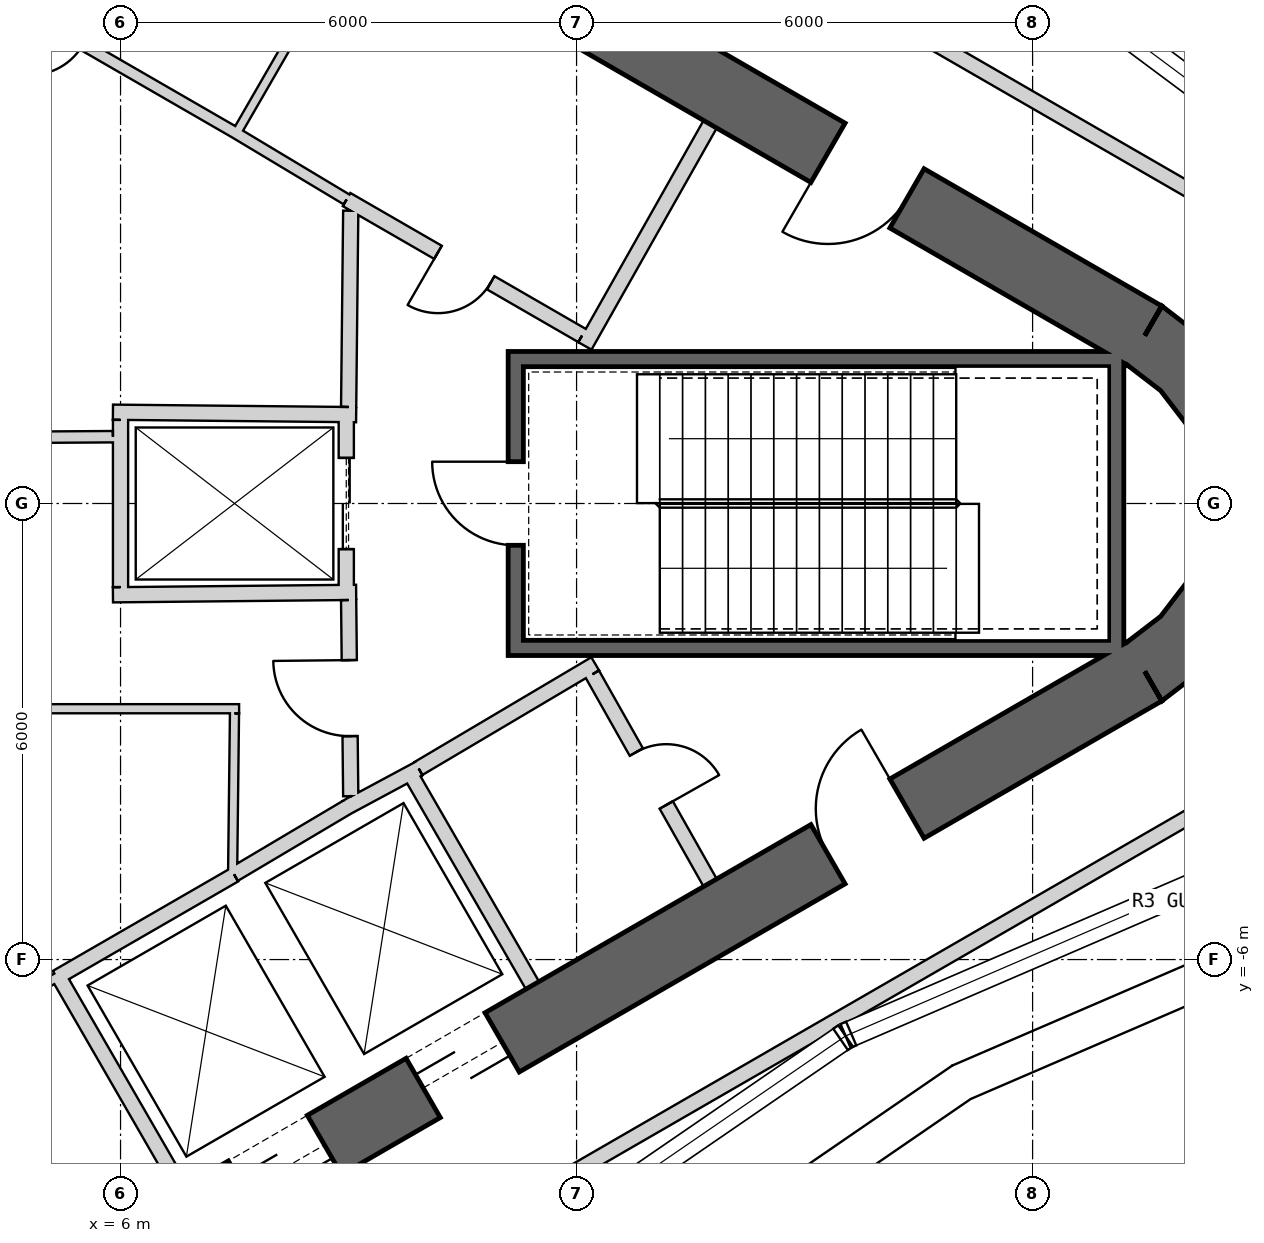
"""IFC4 building model, lengths in metres.
Left out: names, types, materials, properties, quantities, classifications, styles, units other than length and angle.
Written with IfcOpenShell. Run it as: python <this file> out.ifc"""

import sys

from ifc_helpers import new_model, si_unit, direction, frame, frame_2d, origin, place, context, subcontext, project, spatial, polyline, rectangle, outline, extrude, element, fill, save


model = new_model("IFC4")
c1 = context("Model", 3, precision=1e-05, world=origin(), true_north=direction((0.0, 1.0)))
c2 = subcontext(c1, "Body", "Model", "MODEL_VIEW")
j1 = project(units=[si_unit("LENGTHUNIT", "METRE"), si_unit("PLANEANGLEUNIT", "RADIAN")], contexts=[c1])
p1 = place(None, origin())
s1 = spatial("IfcSite", under=j1, at=p1, CompositionType="ELEMENT")
p2 = place(p1, origin())
s2 = spatial("IfcBuilding", under=s1, at=p2, CompositionType="ELEMENT")
p3 = place(p2, frame((0.0, 0.0, 435.3)))
s3 = spatial("IfcBuildingStorey", under=s2, at=p3, CompositionType="ELEMENT", Elevation=435.3)
p4 = place(p3, frame((19.475, 2.208, 0.0), z_axis=(0.0, 0.0, 1.0), x_axis=(-0.866028369851, 0.499994862586, 0.0)))
e1 = element("IfcWall", 1, at=p4, inside=s3, PredefinedType="SHEAR", context=c2, shape_type="SweptSolid", body=[
    extrude(rectangle(XDim=31.523, YDim=0.9, at=frame_2d((15.762, 0.0))), origin(), (0.0, 0.0, 1.0), 5.0),
])
p5 = place(p4, frame((3.612, 0.0, 0.0)))
e2 = element("IfcOpeningElement", 2, at=p5, cuts=e1, PredefinedType="OPENING", context=c2, shape_type="SweptSolid", body=[
    extrude(rectangle(XDim=1.2, YDim=2.4, at=frame_2d((0.6, 1.2))), frame((0.0, 0.46, 0.0), z_axis=(0.0, -1.0, 0.0), x_axis=(1.0, 0.0, 0.0)), (0.0, 0.0, 1.0), 0.92),
])
p6 = place(p4, frame((26.712, 0.0, 0.0)))
e3 = element("IfcOpeningElement", 3, at=p6, cuts=e1, PredefinedType="OPENING", context=c2, shape_type="SweptSolid", body=[
    extrude(rectangle(XDim=1.2, YDim=2.4, at=frame_2d((0.6, 1.2))), frame((0.0, 0.46, 0.0), z_axis=(0.0, -1.0, 0.0), x_axis=(1.0, 0.0, 0.0)), (0.0, 0.0, 1.0), 0.92),
])
p7 = place(p3, frame((-7.825, -17.97, 0.0), z_axis=(0.0, 0.0, 1.0), x_axis=(0.866028369851, 0.499994862586, 0.0)))
e4 = element("IfcWall", 4, at=p7, inside=s3, PredefinedType="SHEAR", context=c2, shape_type="SweptSolid", body=[
    extrude(rectangle(XDim=31.523, YDim=0.9, at=frame_2d((15.762, 0.0))), origin(), (0.0, 0.0, 1.0), 5.0),
])
p8 = place(p7, frame((17.862, 0.0, 0.0)))
e5 = element("IfcOpeningElement", 5, at=p8, cuts=e4, PredefinedType="OPENING", context=c2, shape_type="SweptSolid", body=[
    extrude(rectangle(XDim=1.2, YDim=2.4, at=frame_2d((0.6, 1.2))), frame((0.0, 0.46, 0.0), z_axis=(0.0, -1.0, 0.0), x_axis=(1.0, 0.0, 0.0)), (0.0, 0.0, 1.0), 0.92),
])
p9 = place(p7, frame((20.562, 0.0, 0.0)))
e6 = element("IfcOpeningElement", 6, at=p9, cuts=e4, PredefinedType="OPENING", context=c2, shape_type="SweptSolid", body=[
    extrude(rectangle(XDim=1.2, YDim=2.4, at=frame_2d((0.6, 1.2))), frame((0.0, 0.46, 0.0), z_axis=(0.0, -1.0, 0.0), x_axis=(1.0, 0.0, 0.0)), (0.0, 0.0, 1.0), 0.92),
])
p10 = place(p7, frame((26.712, 0.0, 0.0)))
e7 = element("IfcOpeningElement", 7, at=p10, cuts=e4, PredefinedType="OPENING", context=c2, shape_type="SweptSolid", body=[
    extrude(rectangle(XDim=1.2, YDim=2.4, at=frame_2d((0.6, 1.2))), frame((0.0, 0.46, 0.0), z_axis=(0.0, -1.0, 0.0), x_axis=(1.0, 0.0, 0.0)), (0.0, 0.0, 1.0), 0.92),
])
p11 = place(p7, frame((3.612, 0.0, 0.0)))
e8 = element("IfcOpeningElement", 8, at=p11, cuts=e4, PredefinedType="OPENING", context=c2, shape_type="SweptSolid", body=[
    extrude(rectangle(XDim=1.2, YDim=2.4, at=frame_2d((0.6, 1.2))), frame((0.0, 0.46, 0.0), z_axis=(0.0, -1.0, 0.0), x_axis=(1.0, 0.0, 0.0)), (0.0, 0.0, 1.0), 0.92),
])
p12 = place(p3, origin())
e9 = element("IfcWall", 9, at=p12, inside=s3, PredefinedType="SHEAR", context=c2, shape_type="SweptSolid", body=[
    extrude(outline(polyline([(19.7, -2.598), (20.321, -2.121), (20.798, -1.5), (21.098, -0.777), (21.2, 0.0), (21.098, 0.777), (20.798, 1.5), (20.321, 2.121), (19.7, 2.598), (19.25, 1.819), (19.685, 1.485), (20.019, 1.05), (20.229, 0.543), (20.3, 0.0), (20.229, -0.543), (20.019, -1.05), (19.685, -1.485), (19.25, -1.819), (19.7, -2.598)])), origin(), (0.0, 0.0, 1.0), 5.0),
])
p13 = place(p3, frame((6.795, -9.01, 0.0), z_axis=(0.0, 0.0, 1.0), x_axis=(-0.499984717929, 0.866034226713, 0.0)))
e10 = element("IfcWall", 10, at=p13, inside=s3, PredefinedType="PLUMBINGWALL", context=c2, shape_type="SweptSolid", body=[
    extrude(rectangle(XDim=3.25, YDim=0.2, at=frame_2d((1.625, 0.0))), origin(), (0.0, 0.0, 1.0), 4.75),
])
p14 = place(p3, frame((5.159, -6.236, 0.0), z_axis=(0.0, 0.0, 1.0), x_axis=(0.866036505625, 0.499980770555, 0.0)))
e11 = element("IfcWall", 11, at=p14, inside=s3, PredefinedType="PLUMBINGWALL", context=c2, shape_type="SweptSolid", body=[
    extrude(rectangle(XDim=2.7, YDim=0.2, at=frame_2d((1.35, 0.0))), origin(), (0.0, 0.0, 1.0), 4.75),
])
p15 = place(p3, frame((9.795, -3.525, 0.0), z_axis=(0.0, 0.0, 1.0), x_axis=(0.499984717929, -0.866034226713, 0.0)))
e12 = element("IfcWall", 12, at=p15, inside=s3, PredefinedType="PLUMBINGWALL", context=c2, shape_type="SweptSolid", body=[
    extrude(rectangle(XDim=3.25, YDim=0.2, at=frame_2d((1.625, 0.0))), origin(), (0.0, 0.0, 1.0), 4.75),
])
p16 = place(p3, frame((8.974, -3.999, 0.0), z_axis=(0.0, 0.0, 1.0), x_axis=(0.880907015104, 0.473289373154, 0.0)))
e13 = element("IfcWall", 13, at=p16, inside=s3, PredefinedType="PLUMBINGWALL", context=c2, shape_type="SweptSolid", body=[
    extrude(rectangle(XDim=1.078, YDim=0.2, at=frame_2d((0.539, 0.0))), origin(), (0.0, 0.0, 1.0), 4.75),
])
p17 = place(p3, frame((7.493, -4.878, 0.0), z_axis=(0.0, 0.0, 1.0), x_axis=(0.859981807212, 0.510324691999, 0.0)))
e14 = element("IfcWall", 14, at=p17, inside=s3, PredefinedType="PLUMBINGWALL", context=c2, shape_type="SweptSolid", body=[
    extrude(rectangle(XDim=1.845, YDim=0.2, at=frame_2d((0.922, 0.0))), origin(), (0.0, 0.0, 1.0), 4.75),
])
p18 = place(p3, frame((19.2, 1.9, -0.25), z_axis=(0.0, 0.0, 1.0), x_axis=(-1.0, 0.0, 0.0)))
e15 = element("IfcWall", 15, at=p18, inside=s3, PredefinedType="SHEAR", context=c2, shape_type="SweptSolid", body=[
    extrude(rectangle(XDim=8.1, YDim=0.2, at=frame_2d((4.05, 0.0))), origin(), (0.0, 0.0, 1.0), 5.0),
])
p19 = place(p3, frame((19.1, -2.0, -0.25), z_axis=(0.0, 0.0, 1.0), x_axis=(0.0, 1.0, 0.0)))
e16 = element("IfcWall", 16, at=p19, inside=s3, PredefinedType="SHEAR", context=c2, shape_type="SweptSolid", body=[
    extrude(rectangle(XDim=3.8, YDim=0.2, at=frame_2d((1.9, 0.0))), origin(), (0.0, 0.0, 1.0), 5.0),
])
p20 = place(p3, frame((11.1, -1.9, -0.25), z_axis=(0.0, 0.0, 1.0), x_axis=(1.0, 0.0, 0.0)))
e17 = element("IfcWall", 17, at=p20, inside=s3, PredefinedType="SHEAR", context=c2, shape_type="SweptSolid", body=[
    extrude(rectangle(XDim=7.9, YDim=0.2, at=frame_2d((3.95, 0.0))), origin(), (0.0, 0.0, 1.0), 5.0),
])
p21 = place(p3, frame((11.2, -1.8, -0.25), z_axis=(0.0, 0.0, 1.0), x_axis=(0.0, 1.0, 0.0)))
e18 = element("IfcWall", 18, at=p21, inside=s3, PredefinedType="SHEAR", context=c2, shape_type="SweptSolid", body=[
    extrude(rectangle(XDim=3.6, YDim=0.2, at=frame_2d((1.8, 0.0))), origin(), (0.0, 0.0, 1.0), 5.0),
])
p22 = place(p21, frame((1.25, 0.0, 0.25)))
e19 = element("IfcOpeningElement", 19, at=p22, cuts=e18, PredefinedType="OPENING", context=c2, shape_type="SweptSolid", body=[
    extrude(rectangle(XDim=1.1, YDim=2.1, at=frame_2d((0.55, 1.05))), frame((0.0, 0.11, 0.0), z_axis=(0.0, -1.0, 0.0), x_axis=(1.0, 0.0, 0.0)), (0.0, 0.0, 1.0), 0.22),
])
p23 = place(p3, frame((8.97, 1.2, 0.0), z_axis=(0.0, 0.0, 1.0), x_axis=(0.0, -1.0, 0.0)))
e20 = element("IfcWall", 20, at=p23, inside=s3, PredefinedType="PLUMBINGWALL", context=c2, shape_type="SweptSolid", body=[
    extrude(rectangle(XDim=2.4, YDim=0.2, at=frame_2d((1.2, 0.0))), origin(), (0.0, 0.0, 1.0), 4.75),
])
p24 = place(p23, frame((0.6, 0.0, 0.0)))
e21 = element("IfcOpeningElement", 21, at=p24, cuts=e20, PredefinedType="OPENING", context=c2, shape_type="SweptSolid", body=[
    extrude(rectangle(XDim=1.2, YDim=2.4, at=frame_2d((0.6, 1.2))), frame((0.0, 0.11, 0.0), z_axis=(0.0, -1.0, 0.0), x_axis=(1.0, 0.0, 0.0)), (0.0, 0.0, 1.0), 0.22),
])
p25 = place(p3, frame((6.0, -1.1, 0.0), z_axis=(0.0, 0.0, 1.0), x_axis=(0.0, 1.0, 0.0)))
e22 = element("IfcWall", 22, at=p25, inside=s3, PredefinedType="PLUMBINGWALL", context=c2, shape_type="SweptSolid", body=[
    extrude(rectangle(XDim=2.2, YDim=0.2, at=frame_2d((1.1, 0.0))), origin(), (0.0, 0.0, 1.0), 4.75),
])
for number, where, z_axis, x_axis in (
    (23, (5.9, 1.201, 0.0), (0.0, 0.0, 1.0), (1.0, -0.01, 0.0)),
    (24, (5.9, -1.201, 0.0), (0.0, 0.0, 1.0), (1.0, 0.01, 0.0)),
):
    element("IfcWall", number, at=place(p3, frame(where, z_axis=z_axis, x_axis=x_axis)), inside=s3, PredefinedType="PLUMBINGWALL", context=c2, shape_type="SweptSolid", body=[
        extrude(rectangle(XDim=3.2, YDim=0.2, at=frame_2d((1.6, 0.0))), origin(), (0.0, 0.0, 1.0), 4.75),
    ])
p26 = place(p3, frame((9.133, 7.659, 0.0), z_axis=(0.0, 0.0, 1.0), x_axis=(-0.500017246033, -0.866015446554, 0.0)))
e25 = element("IfcWall", 25, at=p26, inside=s3, PredefinedType="PARTITIONING", context=c2, shape_type="SweptSolid", body=[
    extrude(rectangle(XDim=3.25, YDim=0.12, at=frame_2d((1.625, 0.0))), origin(), (0.0, 0.0, 1.0), 4.75),
])
p27 = place(p3, frame((12.11, 2.073, 0.0), z_axis=(0.0, 0.0, 1.0), x_axis=(0.49196600604, 0.870614408852, 0.0)))
e26 = element("IfcWall", 26, at=p27, inside=s3, PredefinedType="PARTITIONING", context=c2, shape_type="SweptSolid", body=[
    extrude(rectangle(XDim=3.35, YDim=0.2, at=frame_2d((1.675, 0.0))), origin(), (0.0, 0.0, 1.0), 4.75),
])
p28 = place(p3, frame((8.974, 3.999, 0.0), z_axis=(0.0, 0.0, 1.0), x_axis=(0.86601284211, -0.500021756827, 0.0)))
e27 = element("IfcWall", 27, at=p28, inside=s3, PredefinedType="PARTITIONING", context=c2, shape_type="SweptSolid", body=[
    extrude(rectangle(XDim=3.577, YDim=0.2, at=frame_2d((1.789, 0.0))), origin(), (0.0, 0.0, 1.0), 4.75),
])
p29 = place(p28, frame((1.389, 0.0, 0.0)))
e28 = element("IfcOpeningElement", 28, at=p29, cuts=e27, PredefinedType="OPENING", context=c2, shape_type="SweptSolid", body=[
    extrude(rectangle(XDim=0.8, YDim=2.1, at=frame_2d((0.4, 1.05))), frame((0.0, 0.11, 0.0), z_axis=(0.0, -1.0, 0.0), x_axis=(1.0, 0.0, 0.0)), (0.0, 0.0, 1.0), 0.22),
])
p30 = place(p3, frame((8.975, 4.0, 0.0), z_axis=(0.0, 0.0, 1.0), x_axis=(-0.857530436795, 0.514433231791, 0.0)))
e29 = element("IfcWall", 29, at=p30, inside=s3, PredefinedType="PLUMBINGWALL", context=c2, shape_type="SweptSolid", body=[
    extrude(rectangle(XDim=1.723, YDim=0.15, at=frame_2d((0.861, 0.0))), origin(), (0.0, 0.0, 1.0), 4.75),
])
p31 = place(p3, frame((7.497, 4.886, 0.0), z_axis=(0.0, 0.0, 1.0), x_axis=(-0.866030989016, 0.499990325971, 0.0)))
e30 = element("IfcWall", 30, at=p31, inside=s3, PredefinedType="PLUMBINGWALL", context=c2, shape_type="SweptSolid", body=[
    extrude(rectangle(XDim=8.1, YDim=0.15, at=frame_2d((4.05, 0.0))), origin(), (0.0, 0.0, 1.0), 4.75),
])
p32 = place(p31, frame((2.3, 0.0, 0.0)))
e31 = element("IfcOpeningElement", 31, at=p32, cuts=e30, PredefinedType="OPENING", context=c2, shape_type="SweptSolid", body=[
    extrude(rectangle(XDim=0.8, YDim=2.1, at=frame_2d((0.4, 1.05))), frame((0.0, 0.085, 0.0), z_axis=(0.0, -1.0, 0.0), x_axis=(1.0, 0.0, 0.0)), (0.0, 0.0, 1.0), 0.17),
])
p33 = place(p3, frame((0.483, -8.936, 0.0), z_axis=(0.0, 0.0, 1.0), x_axis=(0.866028230842, 0.499995103361, 0.0)))
e32 = element("IfcWall", 32, at=p33, inside=s3, PredefinedType="PARTITIONING", context=c2, shape_type="SweptSolid", body=[
    extrude(rectangle(XDim=5.4, YDim=0.12, at=frame_2d((2.7, 0.0))), origin(), (0.0, 0.0, 1.0), 4.75),
])
p34 = place(p33, frame((2.3, 0.0, 0.0)))
e33 = element("IfcOpeningElement", 33, at=p34, cuts=e32, PredefinedType="OPENING", context=c2, shape_type="SweptSolid", body=[
    extrude(rectangle(XDim=0.8, YDim=2.1, at=frame_2d((0.4, 1.05))), frame((0.0, 0.07, 0.0), z_axis=(0.0, -1.0, 0.0), x_axis=(1.0, 0.0, 0.0)), (0.0, 0.0, 1.0), 0.14),
])
p35 = place(p3, frame((12.245, -2.109, 0.0), z_axis=(0.0, 0.0, 1.0), x_axis=(-0.860414880418, -0.509594185166, 0.0)))
e34 = element("IfcWall", 34, at=p35, inside=s3, PredefinedType="PARTITIONING", context=c2, shape_type="SweptSolid", body=[
    extrude(rectangle(XDim=2.7, YDim=0.2, at=frame_2d((1.35, 0.0))), origin(), (0.0, 0.0, 1.0), 4.75),
])
p36 = place(p3, frame((13.758, -4.99, 0.0), z_axis=(0.0, 0.0, 1.0), x_axis=(-0.491993409184, 0.87059892334, 0.0)))
e35 = element("IfcWall", 35, at=p36, inside=s3, PredefinedType="PARTITIONING", context=c2, shape_type="SweptSolid", body=[
    extrude(rectangle(XDim=3.15, YDim=0.2, at=frame_2d((1.575, 0.0))), origin(), (0.0, 0.0, 1.0), 4.75),
])
p37 = place(p36, frame((1.175, 0.0, 0.0)))
e36 = element("IfcOpeningElement", 36, at=p37, cuts=e35, PredefinedType="OPENING", context=c2, shape_type="SweptSolid", body=[
    extrude(rectangle(XDim=0.8, YDim=2.1, at=frame_2d((0.4, 1.05))), frame((0.0, 0.11, 0.0), z_axis=(0.0, -1.0, 0.0), x_axis=(1.0, 0.0, 0.0)), (0.0, 0.0, 1.0), 0.22),
])
p38 = place(p3, frame((9.001, 1.27, 0.0), z_axis=(0.0, 0.0, 1.0), x_axis=(0.010780534828, 0.999941888346, 0.0)))
e37 = element("IfcWall", 37, at=p38, inside=s3, PredefinedType="PARTITIONING", context=c2, shape_type="SweptSolid", body=[
    extrude(rectangle(XDim=2.582, YDim=0.2, at=frame_2d((1.291, 0.0))), origin(), (0.0, 0.0, 1.0), 4.75),
])
p39 = place(p3, frame((9.029, -3.851, 0.0), z_axis=(0.0, 0.0, 1.0), x_axis=(-0.010783593937, 0.99994185536, 0.0)))
e38 = element("IfcWall", 38, at=p39, inside=s3, PredefinedType="PARTITIONING", context=c2, shape_type="SweptSolid", body=[
    extrude(rectangle(XDim=2.581, YDim=0.2, at=frame_2d((1.291, 0.0))), origin(), (0.0, 0.0, 1.0), 4.75),
])
p40 = place(p39, frame((0.791, 0.0, 0.0)))
e39 = element("IfcOpeningElement", 39, at=p40, cuts=e38, PredefinedType="OPENING", context=c2, shape_type="SweptSolid", body=[
    extrude(rectangle(XDim=1.0, YDim=2.1, at=frame_2d((0.5, 1.05))), frame((0.0, 0.11, 0.0), z_axis=(0.0, -1.0, 0.0), x_axis=(1.0, 0.0, 0.0)), (0.0, 0.0, 1.0), 0.22),
])
p41 = place(p3, frame((1.344, 0.849, 0.0), z_axis=(0.0, 0.0, 1.0), x_axis=(0.999978627641, 0.00653790957, 0.0)))
e40 = element("IfcWall", 40, at=p41, inside=s3, PredefinedType="PLUMBINGWALL", context=c2, shape_type="SweptSolid", body=[
    extrude(rectangle(XDim=4.556, YDim=0.15, at=frame_2d((2.278, 0.0))), origin(), (0.0, 0.0, 1.0), 4.75),
])
p42 = place(p41, frame((1.942, 0.0, 0.0)))
e41 = element("IfcOpeningElement", 41, at=p42, cuts=e40, PredefinedType="OPENING", context=c2, shape_type="SweptSolid", body=[
    extrude(rectangle(XDim=0.8, YDim=2.1, at=frame_2d((0.4, 1.05))), frame((0.0, 0.085, 0.0), z_axis=(0.0, -1.0, 0.0), x_axis=(1.0, 0.0, 0.0)), (0.0, 0.0, 1.0), 0.17),
])
p43 = place(p3, frame((7.56, -2.7, 0.0), z_axis=(0.0, 0.0, 1.0), x_axis=(-1.0, 0.0, 0.0)))
e42 = element("IfcWall", 42, at=p43, inside=s3, PredefinedType="PARTITIONING", context=c2, shape_type="SweptSolid", body=[
    extrude(rectangle(XDim=3.0, YDim=0.12, at=frame_2d((1.5, 0.0))), origin(), (0.0, 0.0, 1.0), 4.75),
])
p44 = place(p3, frame((7.475, -4.865, 0.0), z_axis=(0.0, 0.0, 1.0), x_axis=(0.011716133148, 0.999931363757, 0.0)))
e43 = element("IfcWall", 43, at=p44, inside=s3, PredefinedType="PARTITIONING", context=c2, shape_type="SweptSolid", body=[
    extrude(rectangle(XDim=2.105, YDim=0.12, at=frame_2d((1.052, 0.0))), origin(), (0.0, 0.0, 1.0), 4.75),
])
p45 = place(p3, frame((20.834, 3.675, 0.0), z_axis=(0.0, 0.0, 1.0), x_axis=(-0.866028536494, 0.499994573949, 0.0)))
e44 = element("IfcWall", 44, at=p45, inside=s3, PredefinedType="PARTITIONING", context=c2, shape_type="SweptSolid", body=[
    extrude(rectangle(XDim=32.411, YDim=0.2, at=frame_2d((16.206, 0.0))), origin(), (0.0, 0.0, 1.0), 4.75),
])
p46 = place(p45, frame((7.7, 0.0, 0.0)))
e45 = element("IfcOpeningElement", 45, at=p46, cuts=e44, PredefinedType="OPENING", context=c2, shape_type="SweptSolid", body=[
    extrude(rectangle(XDim=1.0, YDim=2.1, at=frame_2d((0.5, 1.05))), frame((0.0, 0.11, 0.0), z_axis=(0.0, -1.0, 0.0), x_axis=(1.0, 0.0, 0.0)), (0.0, 0.0, 1.0), 0.22),
])
p47 = place(p45, frame((18.006, 0.0, 0.0)))
e46 = element("IfcOpeningElement", 46, at=p47, cuts=e44, PredefinedType="OPENING", context=c2, shape_type="SweptSolid", body=[
    extrude(rectangle(XDim=1.0, YDim=2.1, at=frame_2d((0.5, 1.05))), frame((0.0, 0.11, 0.0), z_axis=(0.0, -1.0, 0.0), x_axis=(1.0, 0.0, 0.0)), (0.0, 0.0, 1.0), 0.22),
])
p48 = place(p3, frame((6.698, -11.837, 0.0), z_axis=(0.0, 0.0, 1.0), x_axis=(0.866022444471, 0.500005125646, 0.0)))
e47 = element("IfcWall", 47, at=p48, inside=s3, PredefinedType="PARTITIONING", context=c2, shape_type="SweptSolid", body=[
    extrude(rectangle(XDim=16.124, YDim=0.2, at=frame_2d((8.062, 0.0))), origin(), (0.0, 0.0, 1.0), 4.75),
])
p49 = place(p48, frame((2.044, 0.0, 0.0)))
e48 = element("IfcOpeningElement", 48, at=p49, cuts=e47, PredefinedType="OPENING", context=c2, shape_type="SweptSolid", body=[
    extrude(rectangle(XDim=1.0, YDim=2.1, at=frame_2d((0.5, 1.05))), frame((0.0, 0.11, 0.0), z_axis=(0.0, -1.0, 0.0), x_axis=(1.0, 0.0, 0.0)), (0.0, 0.0, 1.0), 0.22),
])
p50 = place(p22, origin())
e49 = element("IfcDoor", 49, at=p50, inside=s3, OperationType="SINGLE_SWING_RIGHT", PredefinedType="USERDEFINED", context=c2, shape_type="SweptSolid", body=[
    extrude(rectangle(XDim=1.1, YDim=2.1, at=frame_2d((0.55, 1.05))), frame((0.0, 0.025, 0.0), z_axis=(0.0, -1.0, 0.0), x_axis=(1.0, 0.0, 0.0)), (0.0, 0.0, 1.0), 0.05),
])
fill(e19, e49)
p51 = place(p40, origin())
e50 = element("IfcDoor", 50, at=p51, inside=s3, OperationType="SINGLE_SWING_RIGHT", PredefinedType="USERDEFINED", context=c2, shape_type="SweptSolid", body=[
    extrude(rectangle(XDim=1.0, YDim=2.1, at=frame_2d((0.5, 1.05))), frame((0.0, 0.025, 0.0), z_axis=(0.0, -1.0, 0.0), x_axis=(1.0, 0.0, 0.0)), (0.0, 0.0, 1.0), 0.05),
])
fill(e39, e50)
p52 = place(p24, origin())
e51 = element("IfcDoor", 51, at=p52, inside=s3, OperationType="SLIDING_TO_LEFT", PredefinedType="USERDEFINED", context=c2, shape_type="SweptSolid", body=[
    extrude(rectangle(XDim=1.2, YDim=2.4, at=frame_2d((0.6, 1.2))), frame((0.0, 0.025, 0.0), z_axis=(0.0, -1.0, 0.0), x_axis=(1.0, 0.0, 0.0)), (0.0, 0.0, 1.0), 0.05),
])
fill(e21, e51)
p53 = place(p29, origin())
e52 = element("IfcDoor", 52, at=p53, inside=s3, OperationType="SINGLE_SWING_LEFT", PredefinedType="USERDEFINED", context=c2, shape_type="SweptSolid", body=[
    extrude(rectangle(XDim=0.8, YDim=2.1, at=frame_2d((0.4, 1.05))), frame((0.0, 0.025, 0.0), z_axis=(0.0, -1.0, 0.0), x_axis=(1.0, 0.0, 0.0)), (0.0, 0.0, 1.0), 0.05),
])
fill(e28, e52)
p54 = place(p37, origin())
e53 = element("IfcDoor", 53, at=p54, inside=s3, OperationType="SINGLE_SWING_LEFT", PredefinedType="USERDEFINED", context=c2, shape_type="SweptSolid", body=[
    extrude(rectangle(XDim=0.8, YDim=2.1, at=frame_2d((0.4, 1.05))), frame((0.0, 0.025, 0.0), z_axis=(0.0, -1.0, 0.0), x_axis=(1.0, 0.0, 0.0)), (0.0, 0.0, 1.0), 0.05),
])
fill(e36, e53)
p55 = place(p8, origin())
e54 = element("IfcDoor", 54, at=p55, inside=s3, OperationType="SLIDING_TO_LEFT", PredefinedType="USERDEFINED", context=c2, shape_type="SweptSolid", body=[
    extrude(rectangle(XDim=1.2, YDim=2.4, at=frame_2d((0.6, 1.2))), frame((0.0, 0.025, 0.0), z_axis=(0.0, -1.0, 0.0), x_axis=(1.0, 0.0, 0.0)), (0.0, 0.0, 1.0), 0.05),
])
fill(e5, e54)
p56 = place(p9, origin())
e55 = element("IfcDoor", 55, at=p56, inside=s3, OperationType="SLIDING_TO_LEFT", PredefinedType="USERDEFINED", context=c2, shape_type="SweptSolid", body=[
    extrude(rectangle(XDim=1.2, YDim=2.4, at=frame_2d((0.6, 1.2))), frame((0.0, 0.025, 0.0), z_axis=(0.0, -1.0, 0.0), x_axis=(1.0, 0.0, 0.0)), (0.0, 0.0, 1.0), 0.05),
])
fill(e6, e55)
p57 = place(p10, origin())
e56 = element("IfcDoor", 56, at=p57, inside=s3, OperationType="SINGLE_SWING_RIGHT", PredefinedType="USERDEFINED", context=c2, shape_type="SweptSolid", body=[
    extrude(rectangle(XDim=1.2, YDim=2.4, at=frame_2d((0.6, 1.2))), frame((0.0, 0.025, 0.0), z_axis=(0.0, -1.0, 0.0), x_axis=(1.0, 0.0, 0.0)), (0.0, 0.0, 1.0), 0.05),
])
fill(e7, e56)
p58 = place(p5, origin())
e57 = element("IfcDoor", 57, at=p58, inside=s3, OperationType="SINGLE_SWING_RIGHT", PredefinedType="USERDEFINED", context=c2, shape_type="SweptSolid", body=[
    extrude(rectangle(XDim=1.2, YDim=2.4, at=frame_2d((0.6, 1.2))), frame((0.0, 0.025, 0.0), z_axis=(0.0, -1.0, 0.0), x_axis=(1.0, 0.0, 0.0)), (0.0, 0.0, 1.0), 0.05),
])
fill(e2, e57)
save(model, sys.argv[1])
